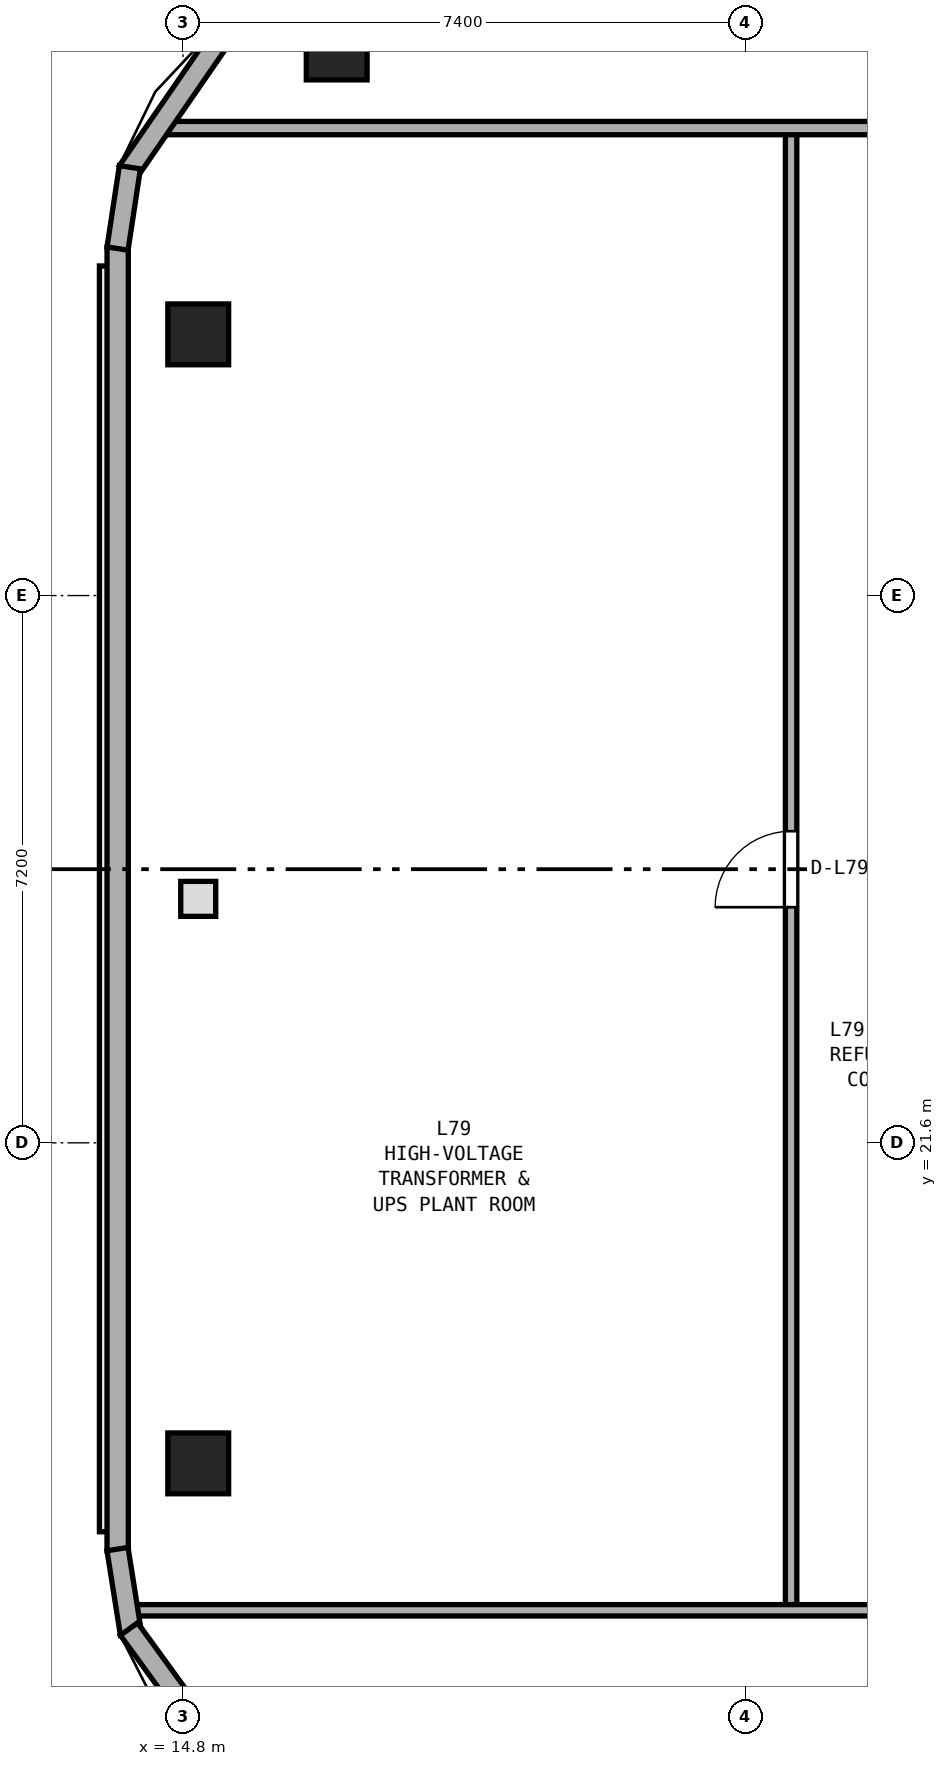
"""IFC4 building model, lengths in metres.
Left out: names, types, materials, properties, quantities, classifications, styles, units other than length and angle.
Written with IfcOpenShell. Run it as: python <this file> out.ifc"""

import sys

from ifc_helpers import new_model, si_unit, direction, frame, frame_2d, origin, origin_2d, place, context, subcontext, project, spatial, rectangle, extrude, element, fill, save


model = new_model("IFC4")
c1 = context("Model", 3, precision=1e-05, world=origin(), true_north=direction((0.0, 1.0)))
c2 = subcontext(c1, "Body", "Model", "MODEL_VIEW")
j1 = project(units=[si_unit("LENGTHUNIT", "METRE"), si_unit("PLANEANGLEUNIT", "RADIAN")], contexts=[c1])
p1 = place(None, origin())
s1 = spatial("IfcSite", under=j1, at=p1, CompositionType="ELEMENT")
p2 = place(p1, origin())
s2 = spatial("IfcBuilding", under=s1, at=p2, CompositionType="ELEMENT")
p3 = place(p2, frame((0.0, 0.0, 308.6)))
s3 = spatial("IfcBuildingStorey", under=s2, at=p3, CompositionType="ELEMENT", Elevation=308.6)
for number, where, z_axis, x_axis in (
    (1, (16.822, 35.984, 0.0), (0.0, 0.0, 1.0), (1.0, 0.0, 0.0)),
    (2, (15.0, 32.236, 0.0), (0.0, 0.0, 1.0), (1.0, 0.0, 0.0)),
    (3, (15.0, 17.383, 0.0), (0.0, 0.0, 1.0), (1.0, 0.0, 0.0)),
):
    element("IfcColumn", number, at=place(p3, frame(where, z_axis=z_axis, x_axis=x_axis)), inside=s3, PredefinedType="COLUMN", context=c2, shape_type="SweptSolid", body=[
        extrude(rectangle(XDim=0.8, YDim=0.8, at=origin_2d()), origin(), (0.0, 0.0, 1.0), 4.8),
    ])
p4 = place(p3, frame((22.8, 15.45, 0.0), z_axis=(0.0, 0.0, 1.0), x_axis=(0.0, 1.0, 0.0)))
e4 = element("IfcWall", 4, at=p4, inside=s3, PredefinedType="PARTITIONING", context=c2, shape_type="SweptSolid", body=[
    extrude(rectangle(XDim=19.5, YDim=0.15, at=frame_2d((9.75, 0.0))), origin(), (0.0, 0.0, 1.0), 4.52),
])
p5 = place(p4, frame((9.25, 0.0, 0.0)))
e5 = element("IfcOpeningElement", 5, at=p5, cuts=e4, PredefinedType="OPENING", context=c2, shape_type="SweptSolid", body=[
    extrude(rectangle(XDim=1.0, YDim=2.04, at=frame_2d((0.5, 1.02))), frame((0.0, 0.085, 0.0), z_axis=(0.0, -1.0, 0.0), x_axis=(1.0, 0.0, 0.0)), (0.0, 0.0, 1.0), 0.17),
])
p6 = place(p3, frame((14.129, 15.45, 0.0), z_axis=(0.0, 0.0, 1.0), x_axis=(1.0, 0.0, 0.0)))
e6 = element("IfcWall", 6, at=p6, inside=s3, PredefinedType="PARTITIONING", context=c2, shape_type="SweptSolid", body=[
    extrude(rectangle(XDim=47.076, YDim=0.15, at=frame_2d((23.538, 0.0))), origin(), (0.0, 0.0, 1.0), 2.12),
])
p7 = place(p6, frame((22.371, 0.0, 0.0)))
e7 = element("IfcOpeningElement", 7, at=p7, cuts=e6, PredefinedType="OPENING", context=c2, shape_type="SweptSolid", body=[
    extrude(rectangle(XDim=1.0, YDim=2.04, at=frame_2d((0.5, 1.02))), frame((0.0, 0.085, 0.0), z_axis=(0.0, -1.0, 0.0), x_axis=(1.0, 0.0, 0.0)), (0.0, 0.0, 1.0), 0.17),
])
p8 = place(p3, frame((14.408, 34.95, 0.0), z_axis=(0.0, 0.0, 1.0), x_axis=(1.0, 0.0, 0.0)))
e8 = element("IfcWall", 8, at=p8, inside=s3, PredefinedType="PARTITIONING", context=c2, shape_type="SweptSolid", body=[
    extrude(rectangle(XDim=46.987, YDim=0.175, at=frame_2d((23.494, 0.0))), origin(), (0.0, 0.0, 1.0), 2.12),
])
p9 = place(p8, frame((22.092, 0.0, 0.0)))
e9 = element("IfcOpeningElement", 9, at=p9, cuts=e8, PredefinedType="OPENING", context=c2, shape_type="SweptSolid", body=[
    extrude(rectangle(XDim=1.0, YDim=2.04, at=frame_2d((0.5, 1.02))), frame((0.0, 0.097, 0.0), z_axis=(0.0, -1.0, 0.0), x_axis=(1.0, 0.0, 0.0)), (0.0, 0.0, 1.0), 0.195),
])
p10 = place(p3, frame((13.94, 33.386, 0.0), z_axis=(0.0, 0.0, 1.0), x_axis=(0.0, -1.0, 0.0)))
e10 = element("IfcWall", 10, at=p10, inside=s3, PredefinedType="STANDARD", context=c2, shape_type="SweptSolid", body=[
    extrude(rectangle(XDim=17.153, YDim=0.28, at=frame_2d((8.576, 0.0))), origin(), (0.0, 0.0, 1.0), 4.52),
])
p11 = place(p3, frame((15.292, 36.138, 0.0), z_axis=(0.0, 0.0, 1.0), x_axis=(-0.567356835945, -0.823472052171, 0.0)))
e11 = element("IfcWall", 11, at=p11, inside=s3, PredefinedType="STANDARD", context=c2, shape_type="SweptSolid", body=[
    extrude(rectangle(XDim=2.139, YDim=0.28, at=frame_2d((1.07, 0.0))), origin(), (0.0, 0.0, 1.0), 4.52),
])
p12 = place(p3, frame((14.101, 34.435, 0.0), z_axis=(0.0, 0.0, 1.0), x_axis=(-0.150072778638, -0.988674952202, 0.0)))
e12 = element("IfcWall", 12, at=p12, inside=s3, PredefinedType="STANDARD", context=c2, shape_type="SweptSolid", body=[
    extrude(rectangle(XDim=1.082, YDim=0.28, at=frame_2d((0.541, 0.0))), origin(), (0.0, 0.0, 1.0), 4.52),
])
p13 = place(p3, frame((13.938, 16.255, 0.0), z_axis=(0.0, 0.0, 1.0), x_axis=(0.156374642871, -0.987697813639, 0.0)))
e13 = element("IfcWall", 13, at=p13, inside=s3, PredefinedType="STANDARD", context=c2, shape_type="SweptSolid", body=[
    extrude(rectangle(XDim=1.126, YDim=0.28, at=frame_2d((0.563, 0.0))), origin(), (0.0, 0.0, 1.0), 4.52),
])
p14 = place(p3, frame((14.089, 15.203, 0.0), z_axis=(0.0, 0.0, 1.0), x_axis=(0.587472992332, -0.809243772469, 0.0)))
e14 = element("IfcWall", 14, at=p14, inside=s3, PredefinedType="STANDARD", context=c2, shape_type="SweptSolid", body=[
    extrude(rectangle(XDim=2.224, YDim=0.28, at=frame_2d((1.112, 0.0))), origin(), (0.0, 0.0, 1.0), 4.52),
])
p15 = place(p5, origin())
e15 = element("IfcDoor", 15, at=p15, inside=s3, OperationType="SINGLE_SWING_LEFT", PredefinedType="DOOR", context=c2, shape_type="SweptSolid", body=[
    extrude(rectangle(XDim=1.0, YDim=2.04, at=frame_2d((0.5, 1.02))), frame((0.0, 0.025, 0.0), z_axis=(0.0, -1.0, 0.0), x_axis=(1.0, 0.0, 0.0)), (0.0, 0.0, 1.0), 0.05),
])
fill(e5, e15)
save(model, sys.argv[1])
